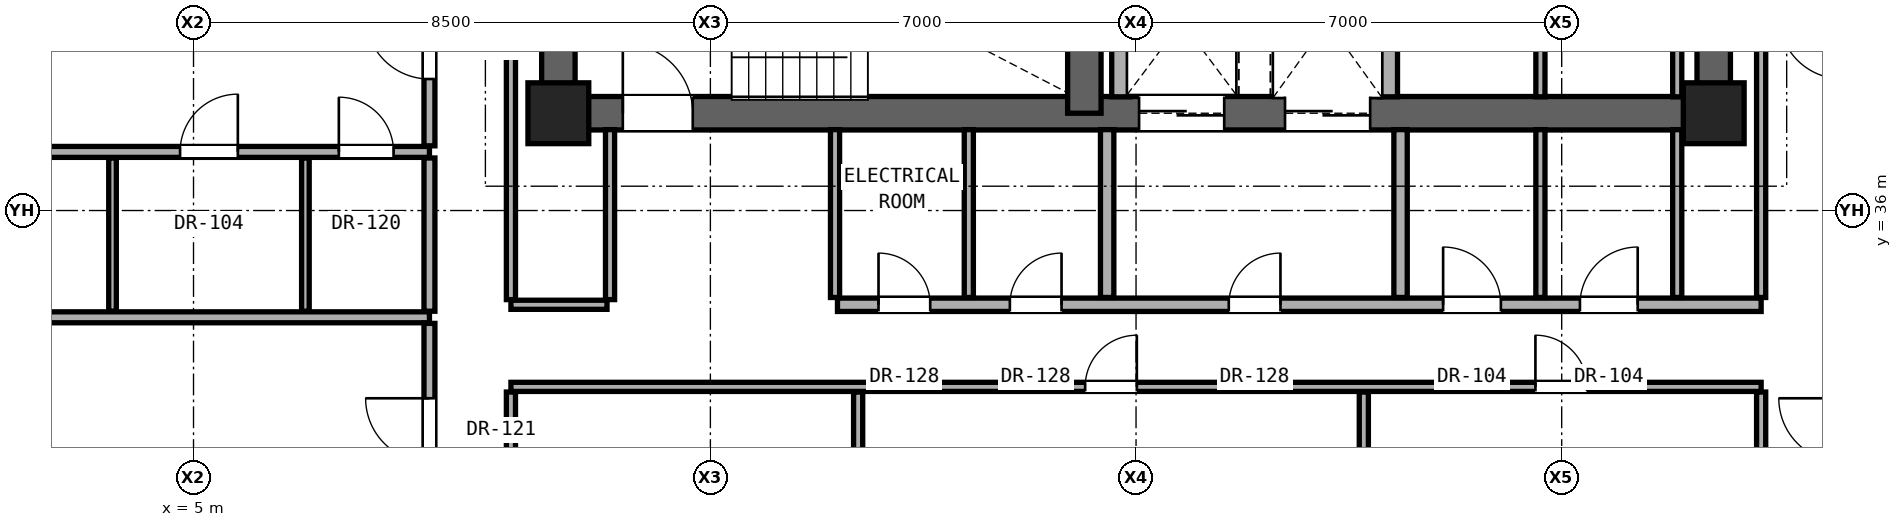
"""IFC4 building model, lengths in metres.
Left out: names, types, materials, properties, quantities, classifications, styles, units other than length and angle.
Written with IfcOpenShell. Run it as: python <this file> out.ifc"""

import sys

from ifc_helpers import new_model, si_unit, direction, frame, frame_2d, origin, origin_2d, place, context, subcontext, project, spatial, rectangle, extrude, element, fill, save


model = new_model("IFC4")
c1 = context("Model", 3, precision=1e-05, world=origin(), true_north=direction((0.0, 1.0)))
c2 = subcontext(c1, "Body", "Model", "MODEL_VIEW")
j1 = project(units=[si_unit("LENGTHUNIT", "METRE"), si_unit("PLANEANGLEUNIT", "RADIAN")], contexts=[c1])
p1 = place(None, origin())
s1 = spatial("IfcSite", under=j1, at=p1, CompositionType="ELEMENT")
p2 = place(p1, origin())
s2 = spatial("IfcBuilding", under=s1, at=p2, CompositionType="ELEMENT")
p3 = place(p2, frame((0.0, 0.0, 177.15)))
s3 = spatial("IfcBuildingStorey", under=s2, at=p3, CompositionType="ELEMENT", Elevation=177.15)
for number, where, z_axis, x_axis in (
    (1, (11.0, 37.6, 0.0), (0.0, 0.0, 1.0), (1.0, 0.0, 0.0)),
    (2, (30.0, 37.6, 0.0), (0.0, 0.0, 1.0), (1.0, 0.0, 0.0)),
):
    element("IfcColumn", number, at=place(p3, frame(where, z_axis=z_axis, x_axis=x_axis)), inside=s3, PredefinedType="COLUMN", context=c2, shape_type="SweptSolid", body=[
        extrude(rectangle(XDim=1.0, YDim=1.0, at=origin_2d()), origin(), (0.0, 0.0, 1.0), 3.25),
    ])
for number, where, z_axis, x_axis in (
    (3, (11.0, 37.6, 0.0), (0.0, 0.0, 1.0), (0.0, 1.0, 0.0)),
    (4, (30.0, 37.6, 0.0), (0.0, 0.0, 1.0), (0.0, 1.0, 0.0)),
):
    element("IfcWall", number, at=place(p3, frame(where, z_axis=z_axis, x_axis=x_axis)), inside=s3, PredefinedType="SHEAR", context=c2, shape_type="SweptSolid", body=[
        extrude(rectangle(XDim=6.0, YDim=0.55, at=frame_2d((3.0, 0.0))), origin(), (0.0, 0.0, 1.0), 3.05),
    ])
p4 = place(p3, frame((11.0, 37.6, 0.0), z_axis=(0.0, 0.0, 1.0), x_axis=(1.0, 0.0, 0.0)))
e5 = element("IfcWall", 5, at=p4, inside=s3, PredefinedType="SHEAR", context=c2, shape_type="SweptSolid", body=[
    extrude(rectangle(XDim=19.0, YDim=0.55, at=frame_2d((9.5, 0.0))), origin(), (0.0, 0.0, 1.0), 3.05),
])
p5 = place(p4, frame((1.06, 0.0, 0.0)))
e6 = element("IfcOpeningElement", 6, at=p5, cuts=e5, PredefinedType="OPENING", context=c2, shape_type="SweptSolid", body=[
    extrude(rectangle(XDim=1.15, YDim=2.2, at=frame_2d((0.575, 1.1))), frame((0.0, 0.285, 0.0), z_axis=(0.0, -1.0, 0.0), x_axis=(1.0, 0.0, 0.0)), (0.0, 0.0, 1.0), 0.57),
])
p6 = place(p4, frame((9.55, 0.0, 0.0)))
e7 = element("IfcOpeningElement", 7, at=p6, cuts=e5, PredefinedType="OPENING", context=c2, shape_type="SweptSolid", body=[
    extrude(rectangle(XDim=1.4, YDim=2.35, at=frame_2d((0.7, 1.175))), frame((0.0, 0.285, 0.0), z_axis=(0.0, -1.0, 0.0), x_axis=(1.0, 0.0, 0.0)), (0.0, 0.0, 1.0), 0.57),
])
p7 = place(p4, frame((11.95, 0.0, 0.0)))
e8 = element("IfcOpeningElement", 8, at=p7, cuts=e5, PredefinedType="OPENING", context=c2, shape_type="SweptSolid", body=[
    extrude(rectangle(XDim=1.4, YDim=2.35, at=frame_2d((0.7, 1.175))), frame((0.0, 0.285, 0.0), z_axis=(0.0, -1.0, 0.0), x_axis=(1.0, 0.0, 0.0)), (0.0, 0.0, 1.0), 0.57),
])
p8 = place(p3, frame((19.65, 37.6, 0.0), z_axis=(0.0, 0.0, 1.0), x_axis=(0.0, 1.0, 0.0)))
e9 = element("IfcWall", 9, at=p8, inside=s3, PredefinedType="SHEAR", context=c2, shape_type="SweptSolid", body=[
    extrude(rectangle(XDim=3.443, YDim=0.55, at=frame_2d((1.721, 0.0))), origin(), (0.0, 0.0, 1.0), 3.05),
])
p9 = place(p3, frame((10.22, 33.1, 0.0), z_axis=(0.0, 0.0, 1.0), x_axis=(1.0, 0.0, 0.0)))
e10 = element("IfcWall", 10, at=p9, inside=s3, PredefinedType="PARTITIONING", context=c2, shape_type="SweptSolid", body=[
    extrude(rectangle(XDim=20.56, YDim=0.15, at=frame_2d((10.28, 0.0))), origin(), (0.0, 0.0, 1.0), 2.186),
])
p10 = place(p9, frame((9.443, 0.0, 0.0)))
e11 = element("IfcOpeningElement", 11, at=p10, cuts=e10, PredefinedType="OPENING", context=c2, shape_type="SweptSolid", body=[
    extrude(rectangle(XDim=0.85, YDim=2.01, at=frame_2d((0.425, 1.005))), frame((0.0, 0.085, 0.0), z_axis=(0.0, -1.0, 0.0), x_axis=(1.0, 0.0, 0.0)), (0.0, 0.0, 1.0), 0.17),
])
p11 = place(p9, frame((16.848, 0.0, 0.0)))
e12 = element("IfcOpeningElement", 12, at=p11, cuts=e10, PredefinedType="OPENING", context=c2, shape_type="SweptSolid", body=[
    extrude(rectangle(XDim=0.85, YDim=2.01, at=frame_2d((0.425, 1.005))), frame((0.0, 0.085, 0.0), z_axis=(0.0, -1.0, 0.0), x_axis=(1.0, 0.0, 0.0)), (0.0, 0.0, 1.0), 0.17),
])
p12 = place(p3, frame((-1.09, 34.244, 0.0), z_axis=(0.0, 0.0, 1.0), x_axis=(1.0, 0.0, 0.0)))
e13 = element("IfcWall", 13, at=p12, inside=s3, PredefinedType="PARTITIONING", context=c2, shape_type="SweptSolid", body=[
    extrude(rectangle(XDim=9.97, YDim=0.18, at=frame_2d((4.985, 0.0))), origin(), (0.0, 0.0, 1.0), 2.269),
])
p13 = place(p3, frame((10.22, 34.45, 0.0), z_axis=(0.0, 0.0, 1.0), x_axis=(1.0, 0.0, 0.0)))
e14 = element("IfcWall", 14, at=p13, inside=s3, PredefinedType="PARTITIONING", context=c2, shape_type="SweptSolid", body=[
    extrude(rectangle(XDim=1.58, YDim=0.15, at=frame_2d((0.79, 0.0))), origin(), (0.0, 0.0, 1.0), 2.186),
])
p14 = place(p3, frame((15.59, 34.45, 0.0), z_axis=(0.0, 0.0, 1.0), x_axis=(1.0, 0.0, 0.0)))
e15 = element("IfcWall", 15, at=p14, inside=s3, PredefinedType="SOLIDWALL", context=c2, shape_type="SweptSolid", body=[
    extrude(rectangle(XDim=15.19, YDim=0.22, at=frame_2d((7.595, 0.0))), origin(), (0.0, 0.0, 1.0), 2.186),
])
p15 = place(p14, frame((6.435, 0.0, 0.0)))
e16 = element("IfcOpeningElement", 16, at=p15, cuts=e15, PredefinedType="OPENING", context=c2, shape_type="SweptSolid", body=[
    extrude(rectangle(XDim=0.85, YDim=2.01, at=frame_2d((0.425, 1.005))), frame((0.0, 0.12, 0.0), z_axis=(0.0, -1.0, 0.0), x_axis=(1.0, 0.0, 0.0)), (0.0, 0.0, 1.0), 0.24),
])
p16 = place(p14, frame((9.96, 0.0, 0.0)))
e17 = element("IfcOpeningElement", 17, at=p16, cuts=e15, PredefinedType="OPENING", context=c2, shape_type="SweptSolid", body=[
    extrude(rectangle(XDim=0.95, YDim=2.15, at=frame_2d((0.475, 1.075))), frame((0.0, 0.12, 0.0), z_axis=(0.0, -1.0, 0.0), x_axis=(1.0, 0.0, 0.0)), (0.0, 0.0, 1.0), 0.24),
])
p17 = place(p14, frame((12.21, 0.0, 0.0)))
e18 = element("IfcOpeningElement", 18, at=p17, cuts=e15, PredefinedType="OPENING", context=c2, shape_type="SweptSolid", body=[
    extrude(rectangle(XDim=0.95, YDim=2.15, at=frame_2d((0.475, 1.075))), frame((0.0, 0.12, 0.0), z_axis=(0.0, -1.0, 0.0), x_axis=(1.0, 0.0, 0.0)), (0.0, 0.0, 1.0), 0.24),
])
p18 = place(p14, frame((0.675, 0.0, 0.0)))
e19 = element("IfcOpeningElement", 19, at=p18, cuts=e15, PredefinedType="OPENING", context=c2, shape_type="SweptSolid", body=[
    extrude(rectangle(XDim=0.85, YDim=2.01, at=frame_2d((0.425, 1.005))), frame((0.0, 0.12, 0.0), z_axis=(0.0, -1.0, 0.0), x_axis=(1.0, 0.0, 0.0)), (0.0, 0.0, 1.0), 0.24),
])
p19 = place(p14, frame((2.835, 0.0, 0.0)))
e20 = element("IfcOpeningElement", 20, at=p19, cuts=e15, PredefinedType="OPENING", context=c2, shape_type="SweptSolid", body=[
    extrude(rectangle(XDim=0.85, YDim=2.01, at=frame_2d((0.425, 1.005))), frame((0.0, 0.12, 0.0), z_axis=(0.0, -1.0, 0.0), x_axis=(1.0, 0.0, 0.0)), (0.0, 0.0, 1.0), 0.24),
])
p20 = place(p3, frame((-1.09, 36.964, 0.0), z_axis=(0.0, 0.0, 1.0), x_axis=(1.0, 0.0, 0.0)))
e21 = element("IfcWall", 21, at=p20, inside=s3, PredefinedType="PARTITIONING", context=c2, shape_type="SweptSolid", body=[
    extrude(rectangle(XDim=9.97, YDim=0.18, at=frame_2d((4.985, 0.0))), origin(), (0.0, 0.0, 1.0), 2.269),
])
p21 = place(p20, frame((1.624, 0.0, 0.0)))
e22 = element("IfcOpeningElement", 22, at=p21, cuts=e21, PredefinedType="OPENING", context=c2, shape_type="SweptSolid", body=[
    extrude(rectangle(XDim=0.95, YDim=2.15, at=frame_2d((0.475, 1.075))), frame((0.0, 0.1, 0.0), z_axis=(0.0, -1.0, 0.0), x_axis=(1.0, 0.0, 0.0)), (0.0, 0.0, 1.0), 0.2),
])
p22 = place(p20, frame((5.869, 0.0, 0.0)))
e23 = element("IfcOpeningElement", 23, at=p22, cuts=e21, PredefinedType="OPENING", context=c2, shape_type="SweptSolid", body=[
    extrude(rectangle(XDim=0.95, YDim=2.15, at=frame_2d((0.475, 1.075))), frame((0.0, 0.1, 0.0), z_axis=(0.0, -1.0, 0.0), x_axis=(1.0, 0.0, 0.0)), (0.0, 0.0, 1.0), 0.2),
])
p23 = place(p20, frame((8.48, 0.0, 0.0)))
e24 = element("IfcOpeningElement", 24, at=p23, cuts=e21, PredefinedType="OPENING", context=c2, shape_type="SweptSolid", body=[
    extrude(rectangle(XDim=0.9, YDim=2.1, at=frame_2d((0.45, 1.05))), frame((0.0, 0.1, 0.0), z_axis=(0.0, -1.0, 0.0), x_axis=(1.0, 0.0, 0.0)), (0.0, 0.0, 1.0), 0.2),
])
for number, where, z_axis, x_axis in (
    (25, (3.668, 34.344, 0.0), (0.0, 0.0, 1.0), (0.0, 1.0, 0.0)),
    (26, (6.84, 34.344, 0.0), (0.0, 0.0, 1.0), (0.0, 1.0, 0.0)),
):
    element("IfcWall", number, at=place(p3, frame(where, z_axis=z_axis, x_axis=x_axis)), inside=s3, PredefinedType="PARTITIONING", context=c2, shape_type="SweptSolid", body=[
        extrude(rectangle(XDim=2.52, YDim=0.125, at=frame_2d((1.26, 0.0))), origin(), (0.0, 0.0, 1.0), 3.05),
    ])
p24 = place(p3, frame((8.88, 30.631, 0.0), z_axis=(0.0, 0.0, 1.0), x_axis=(0.0, 1.0, 0.0)))
e27 = element("IfcWall", 27, at=p24, inside=s3, PredefinedType="PARTITIONING", context=c2, shape_type="SweptSolid", body=[
    extrude(rectangle(XDim=3.513, YDim=0.18, at=frame_2d((1.756, 0.0))), origin(), (0.0, 0.0, 1.0), 2.346),
])
p25 = place(p24, frame((1.231, 0.0, 0.0)))
e28 = element("IfcOpeningElement", 28, at=p25, cuts=e27, PredefinedType="OPENING", context=c2, shape_type="SweptSolid", body=[
    extrude(rectangle(XDim=1.05, YDim=2.2, at=frame_2d((0.525, 1.1))), frame((0.0, 0.1, 0.0), z_axis=(0.0, -1.0, 0.0), x_axis=(1.0, 0.0, 0.0)), (0.0, 0.0, 1.0), 0.2),
])
p26 = place(p3, frame((8.88, 34.344, 0.0), z_axis=(0.0, 0.0, 1.0), x_axis=(0.0, 1.0, 0.0)))
e29 = element("IfcWall", 29, at=p26, inside=s3, PredefinedType="PARTITIONING", context=c2, shape_type="SweptSolid", body=[
    extrude(rectangle(XDim=2.52, YDim=0.18, at=frame_2d((1.26, 0.0))), origin(), (0.0, 0.0, 1.0), 3.05),
])
p27 = place(p3, frame((8.88, 37.064, 0.0), z_axis=(0.0, 0.0, 1.0), x_axis=(0.0, 1.0, 0.0)))
e30 = element("IfcWall", 30, at=p27, inside=s3, PredefinedType="PARTITIONING", context=c2, shape_type="SweptSolid", body=[
    extrude(rectangle(XDim=4.447, YDim=0.18, at=frame_2d((2.224, 0.0))), origin(), (0.0, 0.0, 1.0), 2.442),
])
p28 = place(p27, frame((1.098, 0.0, 0.0)))
e31 = element("IfcOpeningElement", 31, at=p28, cuts=e30, PredefinedType="OPENING", context=c2, shape_type="SweptSolid", body=[
    extrude(rectangle(XDim=1.05, YDim=2.2, at=frame_2d((0.525, 1.1))), frame((0.0, 0.1, 0.0), z_axis=(0.0, -1.0, 0.0), x_axis=(1.0, 0.0, 0.0)), (0.0, 0.0, 1.0), 0.2),
])
p29 = place(p3, frame((10.22, 22.935, 0.0), z_axis=(0.0, 0.0, 1.0), x_axis=(0.0, 1.0, 0.0)))
e32 = element("IfcWall", 32, at=p29, inside=s3, PredefinedType="PARTITIONING", context=c2, shape_type="SweptSolid", body=[
    extrude(rectangle(XDim=10.08, YDim=0.15, at=frame_2d((5.04, 0.0))), origin(), (0.0, 0.0, 1.0), 2.346),
])
p30 = place(p29, frame((4.565, 0.0, 0.0)))
e33 = element("IfcOpeningElement", 33, at=p30, cuts=e32, PredefinedType="OPENING", context=c2, shape_type="SweptSolid", body=[
    extrude(rectangle(XDim=0.95, YDim=2.15, at=frame_2d((0.475, 1.075))), frame((0.0, 0.085, 0.0), z_axis=(0.0, -1.0, 0.0), x_axis=(1.0, 0.0, 0.0)), (0.0, 0.0, 1.0), 0.17),
])
p31 = place(p3, frame((10.22, 34.535, 0.0), z_axis=(0.0, 0.0, 1.0), x_axis=(0.0, 1.0, 0.0)))
e34 = element("IfcWall", 34, at=p31, inside=s3, PredefinedType="PARTITIONING", context=c2, shape_type="SweptSolid", body=[
    extrude(rectangle(XDim=9.13, YDim=0.15, at=frame_2d((4.565, 0.0))), origin(), (0.0, 0.0, 1.0), 2.442),
])
p32 = place(p3, frame((11.85, 34.535, 0.0), z_axis=(0.0, 0.0, 1.0), x_axis=(0.0, 1.0, 0.0)))
e35 = element("IfcWall", 35, at=p32, inside=s3, PredefinedType="PARTITIONING", context=c2, shape_type="SweptSolid", body=[
    extrude(rectangle(XDim=2.795, YDim=0.15, at=frame_2d((1.397, 0.0))), origin(), (0.0, 0.0, 1.0), 3.05),
])
p33 = place(p3, frame((15.55, 34.57, 0.0), z_axis=(0.0, 0.0, 1.0), x_axis=(0.0, 1.0, 0.0)))
e36 = element("IfcWall", 36, at=p33, inside=s3, PredefinedType="PARTITIONING", context=c2, shape_type="SweptSolid", body=[
    extrude(rectangle(XDim=2.76, YDim=0.15, at=frame_2d((1.38, 0.0))), origin(), (0.0, 0.0, 1.0), 3.05),
])
p34 = place(p3, frame((15.93, 25.925, 0.0), z_axis=(0.0, 0.0, 1.0), x_axis=(0.0, 1.0, 0.0)))
e37 = element("IfcWall", 37, at=p34, inside=s3, PredefinedType="PARTITIONING", context=c2, shape_type="SweptSolid", body=[
    extrude(rectangle(XDim=7.09, YDim=0.15, at=frame_2d((3.545, 0.0))), origin(), (0.0, 0.0, 1.0), 2.186),
])
p35 = place(p3, frame((17.75, 34.57, 0.0), z_axis=(0.0, 0.0, 1.0), x_axis=(0.0, 1.0, 0.0)))
e38 = element("IfcWall", 38, at=p35, inside=s3, PredefinedType="PARTITIONING", context=c2, shape_type="SweptSolid", body=[
    extrude(rectangle(XDim=2.76, YDim=0.15, at=frame_2d((1.38, 0.0))), origin(), (0.0, 0.0, 1.0), 3.05),
])
p36 = place(p3, frame((20.025, 34.57, 0.0), z_axis=(0.0, 0.0, 1.0), x_axis=(0.0, 1.0, 0.0)))
e39 = element("IfcWall", 39, at=p36, inside=s3, PredefinedType="SOLIDWALL", context=c2, shape_type="SweptSolid", body=[
    extrude(rectangle(XDim=2.76, YDim=0.22, at=frame_2d((1.38, 0.0))), origin(), (0.0, 0.0, 1.0), 3.05),
])
p37 = place(p3, frame((20.25, 37.87, 0.0), z_axis=(0.0, 0.0, 1.0), x_axis=(0.0, 1.0, 0.0)))
e40 = element("IfcWall", 40, at=p37, inside=s3, PredefinedType="SOLIDWALL", context=c2, shape_type="SweptSolid", body=[
    extrude(rectangle(XDim=2.37, YDim=0.3, at=frame_2d((1.185, 0.0))), origin(), (0.0, 0.0, 1.0), 3.05),
])
p38 = place(p3, frame((24.246, 25.925, 0.0), z_axis=(0.0, 0.0, 1.0), x_axis=(0.0, 1.0, 0.0)))
e41 = element("IfcWall", 41, at=p38, inside=s3, PredefinedType="PARTITIONING", context=c2, shape_type="SweptSolid", body=[
    extrude(rectangle(XDim=7.09, YDim=0.15, at=frame_2d((3.545, 0.0))), origin(), (0.0, 0.0, 1.0), 2.186),
])
p39 = place(p3, frame((24.65, 37.87, 0.0), z_axis=(0.0, 0.0, 1.0), x_axis=(0.0, 1.0, 0.0)))
e42 = element("IfcWall", 42, at=p39, inside=s3, PredefinedType="SOLIDWALL", context=c2, shape_type="SweptSolid", body=[
    extrude(rectangle(XDim=2.37, YDim=0.3, at=frame_2d((1.185, 0.0))), origin(), (0.0, 0.0, 1.0), 3.05),
])
p40 = place(p3, frame((24.85, 34.57, 0.0), z_axis=(0.0, 0.0, 1.0), x_axis=(0.0, 1.0, 0.0)))
e43 = element("IfcWall", 43, at=p40, inside=s3, PredefinedType="SOLIDWALL", context=c2, shape_type="SweptSolid", body=[
    extrude(rectangle(XDim=2.76, YDim=0.22, at=frame_2d((1.38, 0.0))), origin(), (0.0, 0.0, 1.0), 3.05),
])
p41 = place(p3, frame((27.15, 34.57, 0.0), z_axis=(0.0, 0.0, 1.0), x_axis=(0.0, 1.0, 0.0)))
e44 = element("IfcWall", 44, at=p41, inside=s3, PredefinedType="PARTITIONING", context=c2, shape_type="SweptSolid", body=[
    extrude(rectangle(XDim=2.76, YDim=0.15, at=frame_2d((1.38, 0.0))), origin(), (0.0, 0.0, 1.0), 3.05),
])
p42 = place(p3, frame((27.15, 37.87, 0.0), z_axis=(0.0, 0.0, 1.0), x_axis=(0.0, 1.0, 0.0)))
e45 = element("IfcWall", 45, at=p42, inside=s3, PredefinedType="PARTITIONING", context=c2, shape_type="SweptSolid", body=[
    extrude(rectangle(XDim=5.33, YDim=0.15, at=frame_2d((2.665, 0.0))), origin(), (0.0, 0.0, 1.0), 3.05),
])
p43 = place(p3, frame((29.4, 34.57, 0.0), z_axis=(0.0, 0.0, 1.0), x_axis=(0.0, 1.0, 0.0)))
e46 = element("IfcWall", 46, at=p43, inside=s3, PredefinedType="PARTITIONING", context=c2, shape_type="SweptSolid", body=[
    extrude(rectangle(XDim=2.76, YDim=0.15, at=frame_2d((1.38, 0.0))), origin(), (0.0, 0.0, 1.0), 3.05),
])
p44 = place(p3, frame((29.4, 37.87, 0.0), z_axis=(0.0, 0.0, 1.0), x_axis=(0.0, 1.0, 0.0)))
e47 = element("IfcWall", 47, at=p44, inside=s3, PredefinedType="PARTITIONING", context=c2, shape_type="SweptSolid", body=[
    extrude(rectangle(XDim=5.33, YDim=0.15, at=frame_2d((2.665, 0.0))), origin(), (0.0, 0.0, 1.0), 3.05),
])
p45 = place(p3, frame((30.78, 25.925, 0.0), z_axis=(0.0, 0.0, 1.0), x_axis=(0.0, 1.0, 0.0)))
e48 = element("IfcWall", 48, at=p45, inside=s3, PredefinedType="PARTITIONING", context=c2, shape_type="SweptSolid", body=[
    extrude(rectangle(XDim=7.09, YDim=0.15, at=frame_2d((3.545, 0.0))), origin(), (0.0, 0.0, 1.0), 2.346),
])
p46 = place(p3, frame((30.78, 34.57, 0.0), z_axis=(0.0, 0.0, 1.0), x_axis=(0.0, 1.0, 0.0)))
e49 = element("IfcWall", 49, at=p46, inside=s3, PredefinedType="PARTITIONING", context=c2, shape_type="SweptSolid", body=[
    extrude(rectangle(XDim=9.095, YDim=0.15, at=frame_2d((4.547, 0.0))), origin(), (0.0, 0.0, 1.0), 2.442),
])
p47 = place(p5, origin())
e50 = element("IfcDoor", 50, at=p47, inside=s3, OperationType="SINGLE_SWING_LEFT", PredefinedType="DOOR", context=c2, shape_type="SweptSolid", body=[
    extrude(rectangle(XDim=1.15, YDim=2.2, at=frame_2d((0.575, 1.1))), frame((0.0, 0.025, 0.0), z_axis=(0.0, -1.0, 0.0), x_axis=(1.0, 0.0, 0.0)), (0.0, 0.0, 1.0), 0.05),
])
fill(e6, e50)
p48 = place(p15, origin())
e51 = element("IfcDoor", 51, at=p48, inside=s3, OperationType="SINGLE_SWING_RIGHT", PredefinedType="DOOR", context=c2, shape_type="SweptSolid", body=[
    extrude(rectangle(XDim=0.85, YDim=2.01, at=frame_2d((0.425, 1.005))), frame((0.0, 0.025, 0.0), z_axis=(0.0, -1.0, 0.0), x_axis=(1.0, 0.0, 0.0)), (0.0, 0.0, 1.0), 0.05),
])
fill(e16, e51)
p49 = place(p16, origin())
e52 = element("IfcDoor", 52, at=p49, inside=s3, OperationType="SINGLE_SWING_LEFT", PredefinedType="DOOR", context=c2, shape_type="SweptSolid", body=[
    extrude(rectangle(XDim=0.95, YDim=2.15, at=frame_2d((0.475, 1.075))), frame((0.0, 0.025, 0.0), z_axis=(0.0, -1.0, 0.0), x_axis=(1.0, 0.0, 0.0)), (0.0, 0.0, 1.0), 0.05),
])
fill(e17, e52)
p50 = place(p17, origin())
e53 = element("IfcDoor", 53, at=p50, inside=s3, OperationType="SINGLE_SWING_RIGHT", PredefinedType="DOOR", context=c2, shape_type="SweptSolid", body=[
    extrude(rectangle(XDim=0.95, YDim=2.15, at=frame_2d((0.475, 1.075))), frame((0.0, 0.025, 0.0), z_axis=(0.0, -1.0, 0.0), x_axis=(1.0, 0.0, 0.0)), (0.0, 0.0, 1.0), 0.05),
])
fill(e18, e53)
p51 = place(p18, origin())
e54 = element("IfcDoor", 54, at=p51, inside=s3, OperationType="SINGLE_SWING_LEFT", PredefinedType="DOOR", context=c2, shape_type="SweptSolid", body=[
    extrude(rectangle(XDim=0.85, YDim=2.01, at=frame_2d((0.425, 1.005))), frame((0.0, 0.025, 0.0), z_axis=(0.0, -1.0, 0.0), x_axis=(1.0, 0.0, 0.0)), (0.0, 0.0, 1.0), 0.05),
])
fill(e19, e54)
p52 = place(p19, origin())
e55 = element("IfcDoor", 55, at=p52, inside=s3, OperationType="SINGLE_SWING_RIGHT", PredefinedType="DOOR", context=c2, shape_type="SweptSolid", body=[
    extrude(rectangle(XDim=0.85, YDim=2.01, at=frame_2d((0.425, 1.005))), frame((0.0, 0.025, 0.0), z_axis=(0.0, -1.0, 0.0), x_axis=(1.0, 0.0, 0.0)), (0.0, 0.0, 1.0), 0.05),
])
fill(e20, e55)
p53 = place(p25, origin())
e56 = element("IfcDoor", 56, at=p53, inside=s3, OperationType="SINGLE_SWING_RIGHT", PredefinedType="DOOR", context=c2, shape_type="SweptSolid", body=[
    extrude(rectangle(XDim=1.05, YDim=2.2, at=frame_2d((0.525, 1.1))), frame((0.0, 0.025, 0.0), z_axis=(0.0, -1.0, 0.0), x_axis=(1.0, 0.0, 0.0)), (0.0, 0.0, 1.0), 0.05),
])
fill(e28, e56)
p54 = place(p28, origin())
e57 = element("IfcDoor", 57, at=p54, inside=s3, OperationType="SINGLE_SWING_RIGHT", PredefinedType="DOOR", context=c2, shape_type="SweptSolid", body=[
    extrude(rectangle(XDim=1.05, YDim=2.2, at=frame_2d((0.525, 1.1))), frame((0.0, 0.025, 0.0), z_axis=(0.0, -1.0, 0.0), x_axis=(1.0, 0.0, 0.0)), (0.0, 0.0, 1.0), 0.05),
])
fill(e31, e57)
p55 = place(p22, origin())
e58 = element("IfcDoor", 58, at=p55, inside=s3, OperationType="SINGLE_SWING_RIGHT", PredefinedType="DOOR", context=c2, shape_type="SweptSolid", body=[
    extrude(rectangle(XDim=0.95, YDim=2.15, at=frame_2d((0.475, 1.075))), frame((0.0, 0.025, 0.0), z_axis=(0.0, -1.0, 0.0), x_axis=(1.0, 0.0, 0.0)), (0.0, 0.0, 1.0), 0.05),
])
fill(e23, e58)
p56 = place(p23, origin())
e59 = element("IfcDoor", 59, at=p56, inside=s3, OperationType="SINGLE_SWING_LEFT", PredefinedType="DOOR", context=c2, shape_type="SweptSolid", body=[
    extrude(rectangle(XDim=0.9, YDim=2.1, at=frame_2d((0.45, 1.05))), frame((0.0, 0.025, 0.0), z_axis=(0.0, -1.0, 0.0), x_axis=(1.0, 0.0, 0.0)), (0.0, 0.0, 1.0), 0.05),
])
fill(e24, e59)
p57 = place(p10, origin())
e60 = element("IfcDoor", 60, at=p57, inside=s3, OperationType="SINGLE_SWING_RIGHT", PredefinedType="DOOR", context=c2, shape_type="SweptSolid", body=[
    extrude(rectangle(XDim=0.85, YDim=2.01, at=frame_2d((0.425, 1.005))), frame((0.0, 0.025, 0.0), z_axis=(0.0, -1.0, 0.0), x_axis=(1.0, 0.0, 0.0)), (0.0, 0.0, 1.0), 0.05),
])
fill(e11, e60)
p58 = place(p11, origin())
e61 = element("IfcDoor", 61, at=p58, inside=s3, OperationType="SINGLE_SWING_LEFT", PredefinedType="DOOR", context=c2, shape_type="SweptSolid", body=[
    extrude(rectangle(XDim=0.85, YDim=2.01, at=frame_2d((0.425, 1.005))), frame((0.0, 0.025, 0.0), z_axis=(0.0, -1.0, 0.0), x_axis=(1.0, 0.0, 0.0)), (0.0, 0.0, 1.0), 0.05),
])
fill(e12, e61)
p59 = place(p6, origin())
e62 = element("IfcDoor", 62, at=p59, inside=s3, OperationType="DOUBLE_DOOR_SLIDING", PredefinedType="DOOR", context=c2, shape_type="SweptSolid", body=[
    extrude(rectangle(XDim=1.4, YDim=2.35, at=frame_2d((0.7, 1.175))), frame((0.0, 0.025, 0.0), z_axis=(0.0, -1.0, 0.0), x_axis=(1.0, 0.0, 0.0)), (0.0, 0.0, 1.0), 0.05),
])
fill(e7, e62)
p60 = place(p7, origin())
e63 = element("IfcDoor", 63, at=p60, inside=s3, OperationType="DOUBLE_DOOR_SLIDING", PredefinedType="DOOR", context=c2, shape_type="SweptSolid", body=[
    extrude(rectangle(XDim=1.4, YDim=2.35, at=frame_2d((0.7, 1.175))), frame((0.0, 0.025, 0.0), z_axis=(0.0, -1.0, 0.0), x_axis=(1.0, 0.0, 0.0)), (0.0, 0.0, 1.0), 0.05),
])
fill(e8, e63)
save(model, sys.argv[1])
